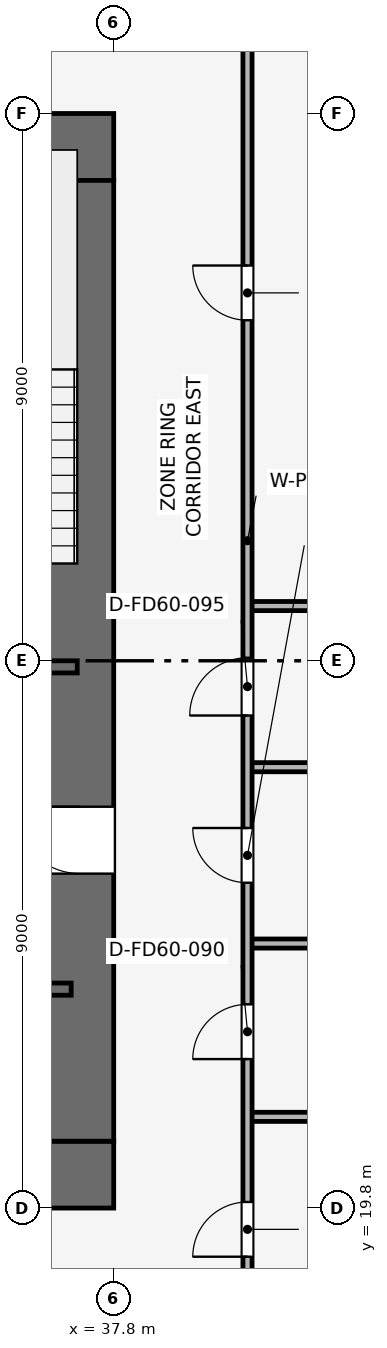
"""IFC4 building model, lengths in metres.
Left out: names, types, materials, properties, quantities, classifications, styles, units other than length and angle.
Written with IfcOpenShell. Run it as: python <this file> out.ifc"""

import sys

from ifc_helpers import new_model, si_unit, direction, frame, frame_2d, origin, place, context, subcontext, project, spatial, rectangle, extrude, element, fill, save


model = new_model("IFC4")
c1 = context("Model", 3, precision=1e-05, world=origin(), true_north=direction((0.0, 1.0)))
c2 = subcontext(c1, "Body", "Model", "MODEL_VIEW")
j1 = project(units=[si_unit("LENGTHUNIT", "METRE"), si_unit("PLANEANGLEUNIT", "RADIAN")], contexts=[c1])
p1 = place(None, origin())
s1 = spatial("IfcSite", under=j1, at=p1, CompositionType="ELEMENT")
p2 = place(p1, origin())
s2 = spatial("IfcBuilding", under=s1, at=p2, CompositionType="ELEMENT")
p3 = place(p2, frame((0.0, 0.0, 72.9)))
s3 = spatial("IfcBuildingStorey", under=s2, at=p3, CompositionType="ELEMENT", Elevation=72.9)
p4 = place(p3, frame((19.8, 20.35, 0.0), z_axis=(0.0, 0.0, 1.0), x_axis=(1.0, 0.0, 0.0)))
e1 = element("IfcWall", 1, at=p4, inside=s3, PredefinedType="SHEAR", context=c2, shape_type="SweptSolid", body=[
    extrude(rectangle(XDim=18.0, YDim=1.1, at=frame_2d((9.0, 0.0))), origin(), (0.0, 0.0, 1.0), 3.9),
])
p5 = place(p4, frame((8.4, 0.0, 0.0)))
e2 = element("IfcOpeningElement", 2, at=p5, cuts=e1, PredefinedType="OPENING", context=c2, shape_type="SweptSolid", body=[
    extrude(rectangle(XDim=1.2, YDim=2.2, at=frame_2d((0.6, 1.1))), frame((0.0, 0.56, 0.0), z_axis=(0.0, -1.0, 0.0), x_axis=(1.0, 0.0, 0.0)), (0.0, 0.0, 1.0), 1.12),
])
p6 = place(p3, frame((19.8, 37.25, 0.0), z_axis=(0.0, 0.0, 1.0), x_axis=(1.0, 0.0, 0.0)))
e3 = element("IfcWall", 3, at=p6, inside=s3, PredefinedType="SHEAR", context=c2, shape_type="SweptSolid", body=[
    extrude(rectangle(XDim=18.0, YDim=1.1, at=frame_2d((9.0, 0.0))), origin(), (0.0, 0.0, 1.0), 3.9),
])
p7 = place(p6, frame((7.05, 0.0, 0.0)))
e4 = element("IfcOpeningElement", 4, at=p7, cuts=e3, PredefinedType="OPENING", context=c2, shape_type="SweptSolid", body=[
    extrude(rectangle(XDim=1.1, YDim=2.15, at=frame_2d((0.55, 1.075))), frame((0.0, 0.56, 0.0), z_axis=(0.0, -1.0, 0.0), x_axis=(1.0, 0.0, 0.0)), (0.0, 0.0, 1.0), 1.12),
])
p8 = place(p3, frame((37.25, 20.9, 0.0), z_axis=(0.0, 0.0, 1.0), x_axis=(0.0, 1.0, 0.0)))
e5 = element("IfcWall", 5, at=p8, inside=s3, PredefinedType="SHEAR", context=c2, shape_type="SweptSolid", body=[
    extrude(rectangle(XDim=15.8, YDim=1.1, at=frame_2d((7.9, 0.0))), origin(), (0.0, 0.0, 1.0), 3.9),
])
p9 = place(p8, frame((4.4, 0.0, 0.0)))
e6 = element("IfcOpeningElement", 6, at=p9, cuts=e5, PredefinedType="OPENING", context=c2, shape_type="SweptSolid", body=[
    extrude(rectangle(XDim=1.1, YDim=2.15, at=frame_2d((0.55, 1.075))), frame((0.0, 0.56, 0.0), z_axis=(0.0, -1.0, 0.0), x_axis=(1.0, 0.0, 0.0)), (0.0, 0.0, 1.0), 1.12),
])
p10 = place(p3, frame((34.05, 28.7, 0.0), z_axis=(0.0, 0.0, 1.0), x_axis=(1.0, 0.0, 0.0)))
e7 = element("IfcWall", 7, at=p10, inside=s3, PredefinedType="SHEAR", context=c2, shape_type="SweptSolid", body=[
    extrude(rectangle(XDim=3.15, YDim=0.2, at=frame_2d((1.575, 0.0))), origin(), (0.0, 0.0, 1.0), 3.65),
])
p11 = place(p10, frame((0.8, 0.0, 0.0)))
e8 = element("IfcOpeningElement", 8, at=p11, cuts=e7, PredefinedType="OPENING", context=c2, shape_type="SweptSolid", body=[
    extrude(rectangle(XDim=1.0, YDim=2.1, at=frame_2d((0.5, 1.05))), frame((0.0, 0.11, 0.0), z_axis=(0.0, -1.0, 0.0), x_axis=(1.0, 0.0, 0.0)), (0.0, 0.0, 1.0), 0.22),
])
p12 = place(p3, frame((34.05, 23.4, 0.0), z_axis=(0.0, 0.0, 1.0), x_axis=(1.0, 0.0, 0.0)))
e9 = element("IfcWall", 9, at=p12, inside=s3, PredefinedType="SHEAR", context=c2, shape_type="SweptSolid", body=[
    extrude(rectangle(XDim=3.05, YDim=0.2, at=frame_2d((1.525, 0.0))), origin(), (0.0, 0.0, 1.0), 3.65),
])
p13 = place(p12, frame((1.2, 0.0, 0.0)))
e10 = element("IfcOpeningElement", 10, at=p13, cuts=e9, PredefinedType="OPENING", context=c2, shape_type="SweptSolid", body=[
    extrude(rectangle(XDim=1.1, YDim=2.15, at=frame_2d((0.55, 1.075))), frame((0.0, 0.11, 0.0), z_axis=(0.0, -1.0, 0.0), x_axis=(1.0, 0.0, 0.0)), (0.0, 0.0, 1.0), 0.22),
])
p14 = place(p3, frame((40.0, 21.3, 0.0), z_axis=(0.0, 0.0, 1.0), x_axis=(1.0, 0.0, 0.0)))
e11 = element("IfcWall", 11, at=p14, inside=s3, PredefinedType="PARTITIONING", context=c2, shape_type="SweptSolid", body=[
    extrude(rectangle(XDim=16.57, YDim=0.15, at=frame_2d((8.285, 0.0))), origin(), (0.0, 0.0, 1.0), 2.935),
])
p15 = place(p14, frame((9.435, 0.0, 0.0)))
e12 = element("IfcOpeningElement", 12, at=p15, cuts=e11, PredefinedType="OPENING", context=c2, shape_type="SweptSolid", body=[
    extrude(rectangle(XDim=0.9, YDim=2.1, at=frame_2d((0.45, 1.05))), frame((0.0, 0.085, 0.0), z_axis=(0.0, -1.0, 0.0), x_axis=(1.0, 0.0, 0.0)), (0.0, 0.0, 1.0), 0.17),
])
p16 = place(p3, frame((40.0, 29.7, 0.0), z_axis=(0.0, 0.0, 1.0), x_axis=(1.0, 0.0, 0.0)))
e13 = element("IfcWall", 13, at=p16, inside=s3, PredefinedType="PARTITIONING", context=c2, shape_type="SweptSolid", body=[
    extrude(rectangle(XDim=16.57, YDim=0.15, at=frame_2d((8.285, 0.0))), origin(), (0.0, 0.0, 1.0), 2.935),
])
for number, where, z_axis, x_axis in (
    (14, (40.0, 24.15, 0.0), (0.0, 0.0, 1.0), (1.0, 0.0, 0.0)),
    (15, (40.0, 27.05, 0.0), (0.0, 0.0, 1.0), (1.0, 0.0, 0.0)),
):
    element("IfcWall", number, at=place(p3, frame(where, z_axis=z_axis, x_axis=x_axis)), inside=s3, PredefinedType="PARTITIONING", context=c2, shape_type="SweptSolid", body=[
        extrude(rectangle(XDim=3.2, YDim=0.15, at=frame_2d((1.6, 0.0))), origin(), (0.0, 0.0, 1.0), 3.65),
    ])
p17 = place(p3, frame((40.0, 17.6, 0.0), z_axis=(0.0, 0.0, 1.0), x_axis=(0.0, 1.0, 0.0)))
e16 = element("IfcWall", 16, at=p17, inside=s3, PredefinedType="PARTITIONING", context=c2, shape_type="SweptSolid", body=[
    extrude(rectangle(XDim=22.4, YDim=0.15, at=frame_2d((11.2, 0.0))), origin(), (0.0, 0.0, 1.0), 3.085),
])
p18 = place(p17, frame((1.4, 0.0, 0.0)))
e17 = element("IfcOpeningElement", 17, at=p18, cuts=e16, PredefinedType="OPENING", context=c2, shape_type="SweptSolid", body=[
    extrude(rectangle(XDim=0.9, YDim=2.1, at=frame_2d((0.45, 1.05))), frame((0.0, 0.085, 0.0), z_axis=(0.0, -1.0, 0.0), x_axis=(1.0, 0.0, 0.0)), (0.0, 0.0, 1.0), 0.17),
])
p19 = place(p17, frame((4.65, 0.0, 0.0)))
e18 = element("IfcOpeningElement", 18, at=p19, cuts=e16, PredefinedType="OPENING", context=c2, shape_type="SweptSolid", body=[
    extrude(rectangle(XDim=0.9, YDim=2.1, at=frame_2d((0.45, 1.05))), frame((0.0, 0.085, 0.0), z_axis=(0.0, -1.0, 0.0), x_axis=(1.0, 0.0, 0.0)), (0.0, 0.0, 1.0), 0.17),
])
p20 = place(p17, frame((7.55, 0.0, 0.0)))
e19 = element("IfcOpeningElement", 19, at=p20, cuts=e16, PredefinedType="OPENING", context=c2, shape_type="SweptSolid", body=[
    extrude(rectangle(XDim=0.9, YDim=2.1, at=frame_2d((0.45, 1.05))), frame((0.0, 0.085, 0.0), z_axis=(0.0, -1.0, 0.0), x_axis=(1.0, 0.0, 0.0)), (0.0, 0.0, 1.0), 0.17),
])
p21 = place(p17, frame((10.3, 0.0, 0.0)))
e20 = element("IfcOpeningElement", 20, at=p21, cuts=e16, PredefinedType="OPENING", context=c2, shape_type="SweptSolid", body=[
    extrude(rectangle(XDim=0.95, YDim=2.1, at=frame_2d((0.475, 1.05))), frame((0.0, 0.085, 0.0), z_axis=(0.0, -1.0, 0.0), x_axis=(1.0, 0.0, 0.0)), (0.0, 0.0, 1.0), 0.17),
])
p22 = place(p17, frame((16.8, 0.0, 0.0)))
e21 = element("IfcOpeningElement", 21, at=p22, cuts=e16, PredefinedType="OPENING", context=c2, shape_type="SweptSolid", body=[
    extrude(rectangle(XDim=0.9, YDim=2.1, at=frame_2d((0.45, 1.05))), frame((0.0, 0.085, 0.0), z_axis=(0.0, -1.0, 0.0), x_axis=(1.0, 0.0, 0.0)), (0.0, 0.0, 1.0), 0.17),
])
p23 = place(p18, origin())
e22 = element("IfcDoor", 22, at=p23, inside=s3, OperationType="SINGLE_SWING_LEFT", PredefinedType="DOOR", context=c2, shape_type="SweptSolid", body=[
    extrude(rectangle(XDim=0.9, YDim=2.1, at=frame_2d((0.45, 1.05))), frame((0.0, 0.025, 0.0), z_axis=(0.0, -1.0, 0.0), x_axis=(1.0, 0.0, 0.0)), (0.0, 0.0, 1.0), 0.05),
])
fill(e17, e22)
p24 = place(p19, origin())
e23 = element("IfcDoor", 23, at=p24, inside=s3, OperationType="SINGLE_SWING_LEFT", PredefinedType="DOOR", context=c2, shape_type="SweptSolid", body=[
    extrude(rectangle(XDim=0.9, YDim=2.1, at=frame_2d((0.45, 1.05))), frame((0.0, 0.025, 0.0), z_axis=(0.0, -1.0, 0.0), x_axis=(1.0, 0.0, 0.0)), (0.0, 0.0, 1.0), 0.05),
])
fill(e18, e23)
p25 = place(p20, origin())
e24 = element("IfcDoor", 24, at=p25, inside=s3, OperationType="SINGLE_SWING_RIGHT", PredefinedType="DOOR", context=c2, shape_type="SweptSolid", body=[
    extrude(rectangle(XDim=0.9, YDim=2.1, at=frame_2d((0.45, 1.05))), frame((0.0, 0.025, 0.0), z_axis=(0.0, -1.0, 0.0), x_axis=(1.0, 0.0, 0.0)), (0.0, 0.0, 1.0), 0.05),
])
fill(e19, e24)
p26 = place(p21, origin())
e25 = element("IfcDoor", 25, at=p26, inside=s3, OperationType="SINGLE_SWING_LEFT", PredefinedType="DOOR", context=c2, shape_type="SweptSolid", body=[
    extrude(rectangle(XDim=0.95, YDim=2.1, at=frame_2d((0.475, 1.05))), frame((0.0, 0.025, 0.0), z_axis=(0.0, -1.0, 0.0), x_axis=(1.0, 0.0, 0.0)), (0.0, 0.0, 1.0), 0.05),
])
fill(e20, e25)
p27 = place(p22, origin())
e26 = element("IfcDoor", 26, at=p27, inside=s3, OperationType="SINGLE_SWING_RIGHT", PredefinedType="DOOR", context=c2, shape_type="SweptSolid", body=[
    extrude(rectangle(XDim=0.9, YDim=2.1, at=frame_2d((0.45, 1.05))), frame((0.0, 0.025, 0.0), z_axis=(0.0, -1.0, 0.0), x_axis=(1.0, 0.0, 0.0)), (0.0, 0.0, 1.0), 0.05),
])
fill(e21, e26)
p28 = place(p9, origin())
e27 = element("IfcDoor", 27, at=p28, inside=s3, OperationType="SINGLE_SWING_RIGHT", PredefinedType="DOOR", context=c2, shape_type="SweptSolid", body=[
    extrude(rectangle(XDim=1.1, YDim=2.15, at=frame_2d((0.55, 1.075))), frame((0.0, 0.025, 0.0), z_axis=(0.0, -1.0, 0.0), x_axis=(1.0, 0.0, 0.0)), (0.0, 0.0, 1.0), 0.05),
])
fill(e6, e27)
save(model, sys.argv[1])
